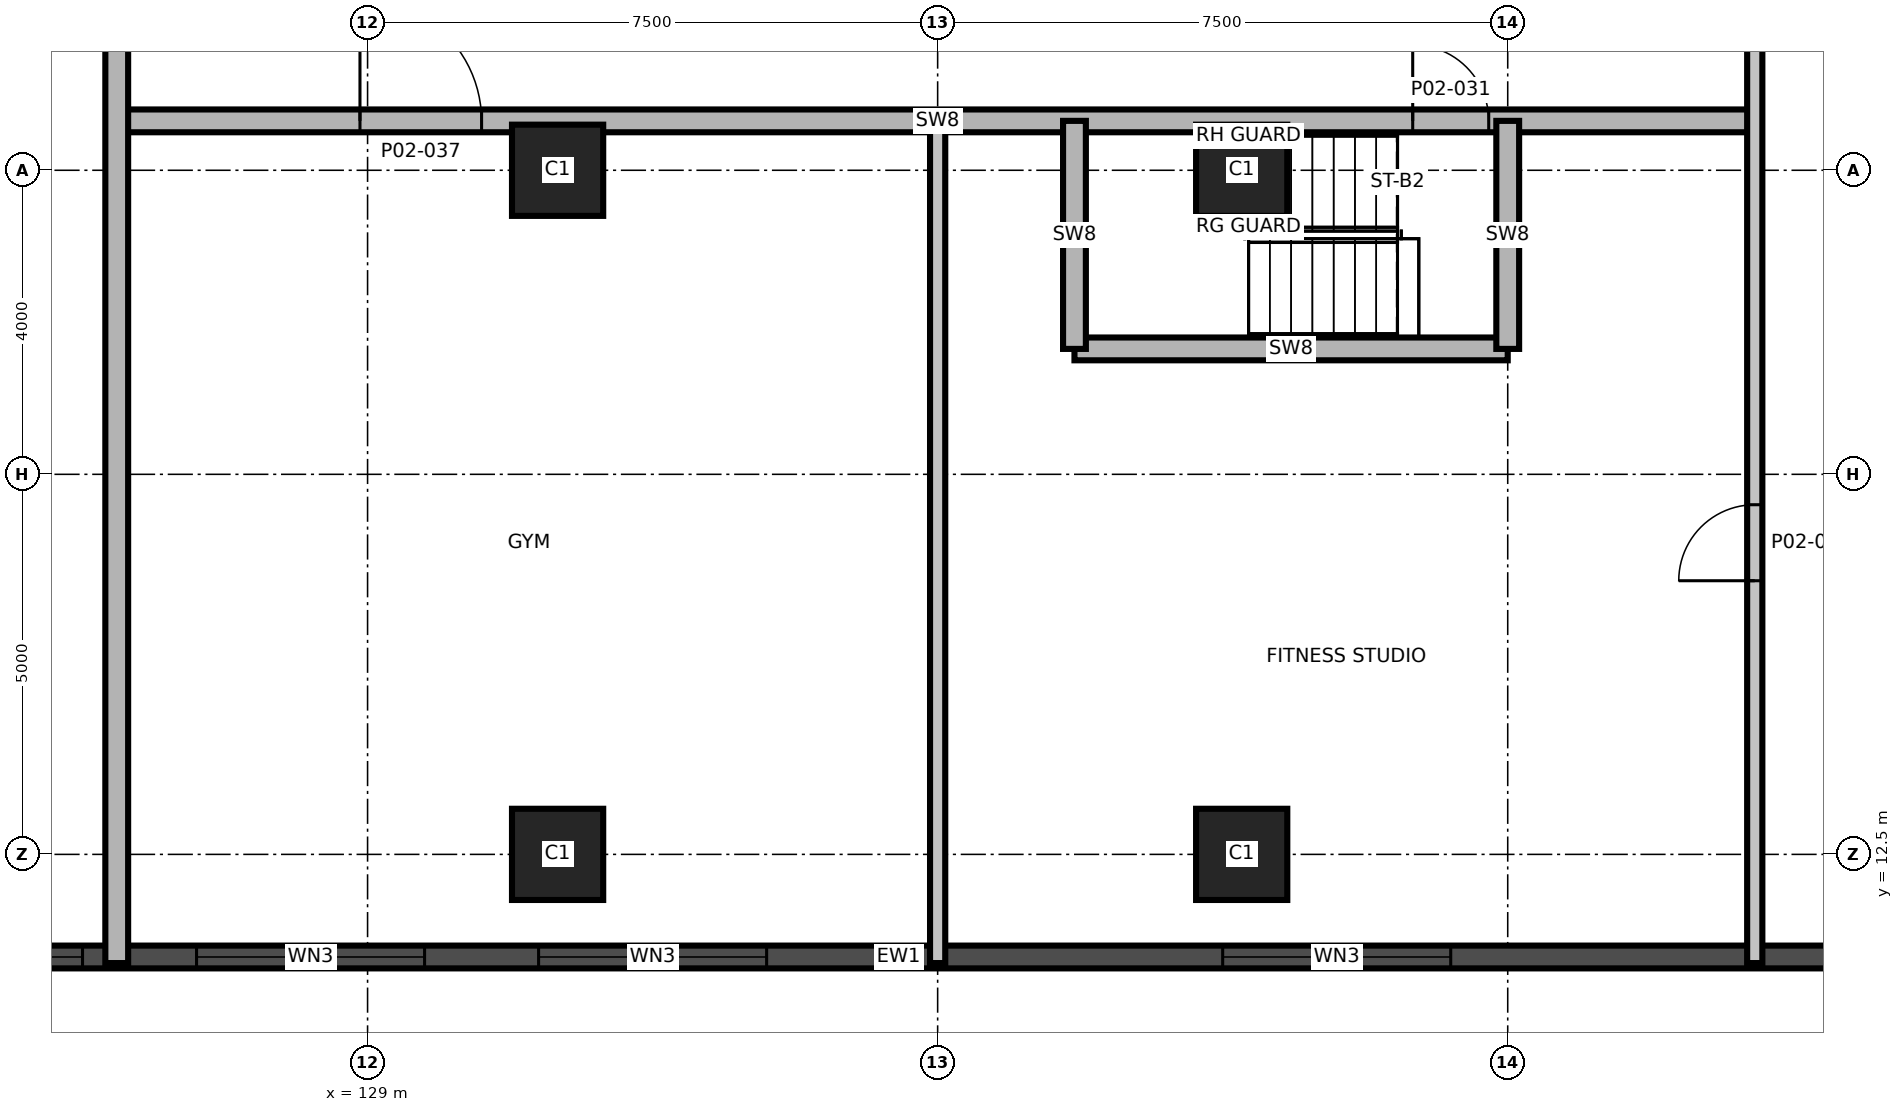
"""IFC4 building model, lengths in metres.
Left out: names, types, materials, properties, quantities, classifications, styles, units other than length and angle.
Written with IfcOpenShell. Run it as: python <this file> out.ifc"""

import sys

from ifc_helpers import new_model, si_unit, direction, frame, frame_2d, origin, origin_2d, place, context, subcontext, project, spatial, rectangle, extrude, element, fill, save


model = new_model("IFC4")
c1 = context("Model", 3, precision=1e-05, world=origin(), true_north=direction((0.0, 1.0)))
c2 = subcontext(c1, "Body", "Model", "MODEL_VIEW")
j1 = project(units=[si_unit("LENGTHUNIT", "METRE"), si_unit("PLANEANGLEUNIT", "RADIAN")], contexts=[c1])
p1 = place(None, origin())
s1 = spatial("IfcSite", under=j1, at=p1, CompositionType="ELEMENT")
p2 = place(p1, origin())
s2 = spatial("IfcBuilding", under=s1, at=p2, CompositionType="ELEMENT")
p3 = place(p2, frame((0.0, 0.0, 13.5)))
s3 = spatial("IfcBuildingStorey", under=s2, at=p3, CompositionType="ELEMENT", Elevation=13.5)
for number, where, z_axis, x_axis in (
    (1, (131.5, 12.5, 0.0), (0.0, 0.0, 1.0), (1.0, 0.0, 0.0)),
    (2, (140.5, 12.5, 0.0), (0.0, 0.0, 1.0), (1.0, 0.0, 0.0)),
    (3, (131.5, 21.5, 0.0), (0.0, 0.0, 1.0), (1.0, 0.0, 0.0)),
    (4, (140.5, 21.5, 0.0), (0.0, 0.0, 1.0), (1.0, 0.0, 0.0)),
):
    element("IfcColumn", number, at=place(p3, frame(where, z_axis=z_axis, x_axis=x_axis)), inside=s3, PredefinedType="COLUMN", context=c2, shape_type="SweptSolid", body=[
        extrude(rectangle(XDim=1.2, YDim=1.2, at=origin_2d()), origin(), (0.0, 0.0, 1.0), 5.0),
    ])
p4 = place(p3, frame((118.048, 11.15, 0.0), z_axis=(0.0, 0.0, 1.0), x_axis=(1.0, 0.0, 0.0)))
e5 = element("IfcWall", 5, at=p4, inside=s3, PredefinedType="SOLIDWALL", context=c2, shape_type="SweptSolid", body=[
    extrude(rectangle(XDim=35.88, YDim=0.3, at=frame_2d((17.94, 0.0))), origin(), (0.0, 0.0, 1.0), 4.7),
])
p5 = place(p4, frame((4.202, 0.0, 0.9)))
e6 = element("IfcOpeningElement", 6, at=p5, cuts=e5, PredefinedType="OPENING", context=c2, shape_type="SweptSolid", body=[
    extrude(rectangle(XDim=3.0, YDim=2.4, at=frame_2d((1.5, 1.2))), frame((0.0, 0.16, 0.0), z_axis=(0.0, -1.0, 0.0), x_axis=(1.0, 0.0, 0.0)), (0.0, 0.0, 1.0), 0.32),
])
p6 = place(p4, frame((8.702, 0.0, 0.9)))
e7 = element("IfcOpeningElement", 7, at=p6, cuts=e5, PredefinedType="OPENING", context=c2, shape_type="SweptSolid", body=[
    extrude(rectangle(XDim=3.0, YDim=2.4, at=frame_2d((1.5, 1.2))), frame((0.0, 0.16, 0.0), z_axis=(0.0, -1.0, 0.0), x_axis=(1.0, 0.0, 0.0)), (0.0, 0.0, 1.0), 0.32),
])
p7 = place(p4, frame((13.202, 0.0, 0.9)))
e8 = element("IfcOpeningElement", 8, at=p7, cuts=e5, PredefinedType="OPENING", context=c2, shape_type="SweptSolid", body=[
    extrude(rectangle(XDim=3.0, YDim=2.4, at=frame_2d((1.5, 1.2))), frame((0.0, 0.16, 0.0), z_axis=(0.0, -1.0, 0.0), x_axis=(1.0, 0.0, 0.0)), (0.0, 0.0, 1.0), 0.32),
])
p8 = place(p4, frame((22.202, 0.0, 0.9)))
e9 = element("IfcOpeningElement", 9, at=p8, cuts=e5, PredefinedType="OPENING", context=c2, shape_type="SweptSolid", body=[
    extrude(rectangle(XDim=3.0, YDim=2.4, at=frame_2d((1.5, 1.2))), frame((0.0, 0.16, 0.0), z_axis=(0.0, -1.0, 0.0), x_axis=(1.0, 0.0, 0.0)), (0.0, 0.0, 1.0), 0.32),
])
p9 = place(p4, frame((31.726, 0.0, 0.9)))
e10 = element("IfcOpeningElement", 10, at=p9, cuts=e5, PredefinedType="OPENING", context=c2, shape_type="SweptSolid", body=[
    extrude(rectangle(XDim=3.0, YDim=2.4, at=frame_2d((1.5, 1.2))), frame((0.0, 0.16, 0.0), z_axis=(0.0, -1.0, 0.0), x_axis=(1.0, 0.0, 0.0)), (0.0, 0.0, 1.0), 0.32),
])
p10 = place(p3, frame((138.3, 19.15, 0.0), z_axis=(0.0, 0.0, 1.0), x_axis=(1.0, 0.0, 0.0)))
e11 = element("IfcWall", 11, at=p10, inside=s3, PredefinedType="SHEAR", context=c2, shape_type="SweptSolid", body=[
    extrude(rectangle(XDim=5.7, YDim=0.3, at=frame_2d((2.85, 0.0))), origin(), (0.0, 0.0, 1.0), 4.7),
])
p11 = place(p3, frame((125.75, 22.15, 0.0), z_axis=(0.0, 0.0, 1.0), x_axis=(1.0, 0.0, 0.0)))
e12 = element("IfcWall", 12, at=p11, inside=s3, PredefinedType="SHEAR", context=c2, shape_type="SweptSolid", body=[
    extrude(rectangle(XDim=21.5, YDim=0.3, at=frame_2d((10.75, 0.0))), origin(), (0.0, 0.0, 1.0), 4.7),
])
p12 = place(p11, frame((17.0, 0.0, 0.0)))
e13 = element("IfcOpeningElement", 13, at=p12, cuts=e12, PredefinedType="OPENING", context=c2, shape_type="SweptSolid", body=[
    extrude(rectangle(XDim=1.0, YDim=2.1, at=frame_2d((0.5, 1.05))), frame((0.0, 0.16, 0.0), z_axis=(0.0, -1.0, 0.0), x_axis=(1.0, 0.0, 0.0)), (0.0, 0.0, 1.0), 0.32),
])
p13 = place(p11, frame((3.15, 0.0, 0.0)))
e14 = element("IfcOpeningElement", 14, at=p13, cuts=e12, PredefinedType="OPENING", context=c2, shape_type="SweptSolid", body=[
    extrude(rectangle(XDim=1.6, YDim=2.1, at=frame_2d((0.8, 1.05))), frame((0.0, 0.16, 0.0), z_axis=(0.0, -1.0, 0.0), x_axis=(1.0, 0.0, 0.0)), (0.0, 0.0, 1.0), 0.32),
])
p14 = place(p3, frame((125.7, 11.07, 0.0), z_axis=(0.0, 0.0, 1.0), x_axis=(0.0, 1.0, 0.0)))
e15 = element("IfcWall", 15, at=p14, inside=s3, PredefinedType="SHEAR", context=c2, shape_type="SweptSolid", body=[
    extrude(rectangle(XDim=38.86, YDim=0.3, at=frame_2d((19.43, 0.0))), origin(), (0.0, 0.0, 1.0), 4.7),
])
p15 = place(p14, frame((14.226, 0.0, 0.0)))
e16 = element("IfcOpeningElement", 16, at=p15, cuts=e15, PredefinedType="OPENING", context=c2, shape_type="SweptSolid", body=[
    extrude(rectangle(XDim=1.0, YDim=2.1, at=frame_2d((0.5, 1.05))), frame((0.0, 0.16, 0.0), z_axis=(0.0, -1.0, 0.0), x_axis=(1.0, 0.0, 0.0)), (0.0, 0.0, 1.0), 0.32),
])
p16 = place(p14, frame((25.835, 0.0, 0.0)))
e17 = element("IfcOpeningElement", 17, at=p16, cuts=e15, PredefinedType="OPENING", context=c2, shape_type="SweptSolid", body=[
    extrude(rectangle(XDim=1.0, YDim=2.1, at=frame_2d((0.5, 1.05))), frame((0.0, 0.16, 0.0), z_axis=(0.0, -1.0, 0.0), x_axis=(1.0, 0.0, 0.0)), (0.0, 0.0, 1.0), 0.32),
])
p17 = place(p3, frame((136.5, 11.07, 0.0), z_axis=(0.0, 0.0, 1.0), x_axis=(0.0, 1.0, 0.0)))
e18 = element("IfcWall", 18, at=p17, inside=s3, PredefinedType="PARTITIONING", context=c2, shape_type="SweptSolid", body=[
    extrude(rectangle(XDim=11.08, YDim=0.2, at=frame_2d((5.54, 0.0))), origin(), (0.0, 0.0, 1.0), 4.7),
])
for number, where, z_axis, x_axis in (
    (19, (138.3, 19.15, 0.0), (0.0, 0.0, 1.0), (0.0, 1.0, 0.0)),
    (20, (144.0, 19.15, 0.0), (0.0, 0.0, 1.0), (0.0, 1.0, 0.0)),
):
    element("IfcWall", number, at=place(p3, frame(where, z_axis=z_axis, x_axis=x_axis)), inside=s3, PredefinedType="SHEAR", context=c2, shape_type="SweptSolid", body=[
        extrude(rectangle(XDim=3.0, YDim=0.3, at=frame_2d((1.5, 0.0))), origin(), (0.0, 0.0, 1.0), 4.7),
    ])
p18 = place(p3, frame((147.25, 11.07, 0.0), z_axis=(0.0, 0.0, 1.0), x_axis=(0.0, 1.0, 0.0)))
e21 = element("IfcWall", 21, at=p18, inside=s3, PredefinedType="PARTITIONING", context=c2, shape_type="SweptSolid", body=[
    extrude(rectangle(XDim=38.86, YDim=0.2, at=frame_2d((19.43, 0.0))), origin(), (0.0, 0.0, 1.0), 4.7),
])
p19 = place(p18, frame((18.18, 0.0, 0.0)))
e22 = element("IfcOpeningElement", 22, at=p19, cuts=e21, PredefinedType="OPENING", context=c2, shape_type="SweptSolid", body=[
    extrude(rectangle(XDim=1.5, YDim=2.1, at=frame_2d((0.75, 1.05))), frame((0.0, 0.11, 0.0), z_axis=(0.0, -1.0, 0.0), x_axis=(1.0, 0.0, 0.0)), (0.0, 0.0, 1.0), 0.22),
])
p20 = place(p18, frame((5.03, 0.0, 0.0)))
e23 = element("IfcOpeningElement", 23, at=p20, cuts=e21, PredefinedType="OPENING", context=c2, shape_type="SweptSolid", body=[
    extrude(rectangle(XDim=1.0, YDim=2.1, at=frame_2d((0.5, 1.05))), frame((0.0, 0.11, 0.0), z_axis=(0.0, -1.0, 0.0), x_axis=(1.0, 0.0, 0.0)), (0.0, 0.0, 1.0), 0.22),
])
p21 = place(p5, origin())
e24 = element("IfcWindow", 24, at=p21, inside=s3, PartitioningType="SINGLE_PANEL", PredefinedType="WINDOW", context=c2, shape_type="SweptSolid", body=[
    extrude(rectangle(XDim=3.0, YDim=2.4, at=frame_2d((1.5, 1.2))), frame((0.0, 0.03, 0.0), z_axis=(0.0, -1.0, 0.0), x_axis=(1.0, 0.0, 0.0)), (0.0, 0.0, 1.0), 0.06),
])
fill(e6, e24)
p22 = place(p6, origin())
e25 = element("IfcWindow", 25, at=p22, inside=s3, PartitioningType="SINGLE_PANEL", PredefinedType="WINDOW", context=c2, shape_type="SweptSolid", body=[
    extrude(rectangle(XDim=3.0, YDim=2.4, at=frame_2d((1.5, 1.2))), frame((0.0, 0.03, 0.0), z_axis=(0.0, -1.0, 0.0), x_axis=(1.0, 0.0, 0.0)), (0.0, 0.0, 1.0), 0.06),
])
fill(e7, e25)
p23 = place(p7, origin())
e26 = element("IfcWindow", 26, at=p23, inside=s3, PartitioningType="SINGLE_PANEL", PredefinedType="WINDOW", context=c2, shape_type="SweptSolid", body=[
    extrude(rectangle(XDim=3.0, YDim=2.4, at=frame_2d((1.5, 1.2))), frame((0.0, 0.03, 0.0), z_axis=(0.0, -1.0, 0.0), x_axis=(1.0, 0.0, 0.0)), (0.0, 0.0, 1.0), 0.06),
])
fill(e8, e26)
p24 = place(p8, origin())
e27 = element("IfcWindow", 27, at=p24, inside=s3, PartitioningType="SINGLE_PANEL", PredefinedType="WINDOW", context=c2, shape_type="SweptSolid", body=[
    extrude(rectangle(XDim=3.0, YDim=2.4, at=frame_2d((1.5, 1.2))), frame((0.0, 0.03, 0.0), z_axis=(0.0, -1.0, 0.0), x_axis=(1.0, 0.0, 0.0)), (0.0, 0.0, 1.0), 0.06),
])
fill(e9, e27)
p25 = place(p12, origin())
e28 = element("IfcDoor", 28, at=p25, inside=s3, OperationType="SINGLE_SWING_LEFT", PredefinedType="DOOR", context=c2, shape_type="SweptSolid", body=[
    extrude(rectangle(XDim=1.0, YDim=2.1, at=frame_2d((0.5, 1.05))), frame((0.0, 0.025, 0.0), z_axis=(0.0, -1.0, 0.0), x_axis=(1.0, 0.0, 0.0)), (0.0, 0.0, 1.0), 0.05),
])
fill(e13, e28)
p26 = place(p13, origin())
e29 = element("IfcDoor", 29, at=p26, inside=s3, OperationType="SINGLE_SWING_LEFT", PredefinedType="DOOR", context=c2, shape_type="SweptSolid", body=[
    extrude(rectangle(XDim=1.6, YDim=2.1, at=frame_2d((0.8, 1.05))), frame((0.0, 0.025, 0.0), z_axis=(0.0, -1.0, 0.0), x_axis=(1.0, 0.0, 0.0)), (0.0, 0.0, 1.0), 0.05),
])
fill(e14, e29)
p27 = place(p20, origin())
e30 = element("IfcDoor", 30, at=p27, inside=s3, OperationType="SINGLE_SWING_RIGHT", PredefinedType="DOOR", context=c2, shape_type="SweptSolid", body=[
    extrude(rectangle(XDim=1.0, YDim=2.1, at=frame_2d((0.5, 1.05))), frame((0.0, 0.025, 0.0), z_axis=(0.0, -1.0, 0.0), x_axis=(1.0, 0.0, 0.0)), (0.0, 0.0, 1.0), 0.05),
])
fill(e23, e30)
save(model, sys.argv[1])
